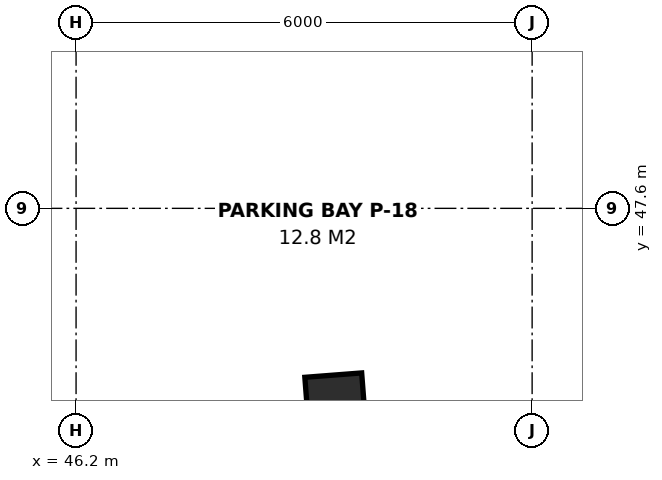
"""IFC4 building model, lengths in metres.
Left out: names, types, materials, properties, quantities, classifications, styles, units other than length and angle.
Written with IfcOpenShell. Run it as: python <this file> out.ifc"""

import sys

from ifc_helpers import new_model, si_unit, direction, frame, origin, origin_2d, place, context, subcontext, project, spatial, circle, extrude, element, save


model = new_model("IFC4")
c1 = context("Model", 3, precision=1e-05, world=origin(), true_north=direction((0.0, 1.0)))
c2 = subcontext(c1, "Body", "Model", "MODEL_VIEW")
j1 = project(units=[si_unit("LENGTHUNIT", "METRE"), si_unit("PLANEANGLEUNIT", "RADIAN")], contexts=[c1])
p1 = place(None, origin())
s1 = spatial("IfcSite", under=j1, at=p1, CompositionType="ELEMENT")
p2 = place(p1, origin())
s2 = spatial("IfcBuilding", under=s1, at=p2, CompositionType="ELEMENT")
p3 = place(p2, frame((0.0, 0.0, -4.2)))
s3 = spatial("IfcBuildingStorey", under=s2, at=p3, CompositionType="ELEMENT", Elevation=-4.2)
p4 = place(p3, frame((49.612, 45.032, 0.0), z_axis=(0.0, 0.0, 1.0), x_axis=(0.997039347045, 0.076893045491, 0.0)))
e1 = element("IfcColumn", 1, at=p4, inside=s3, PredefinedType="COLUMN", context=c2, shape_type="SweptSolid", body=[
    extrude(circle(Radius=0.375, at=origin_2d()), origin(), (0.0, 0.0, 1.0), 4.2),
])
save(model, sys.argv[1])
